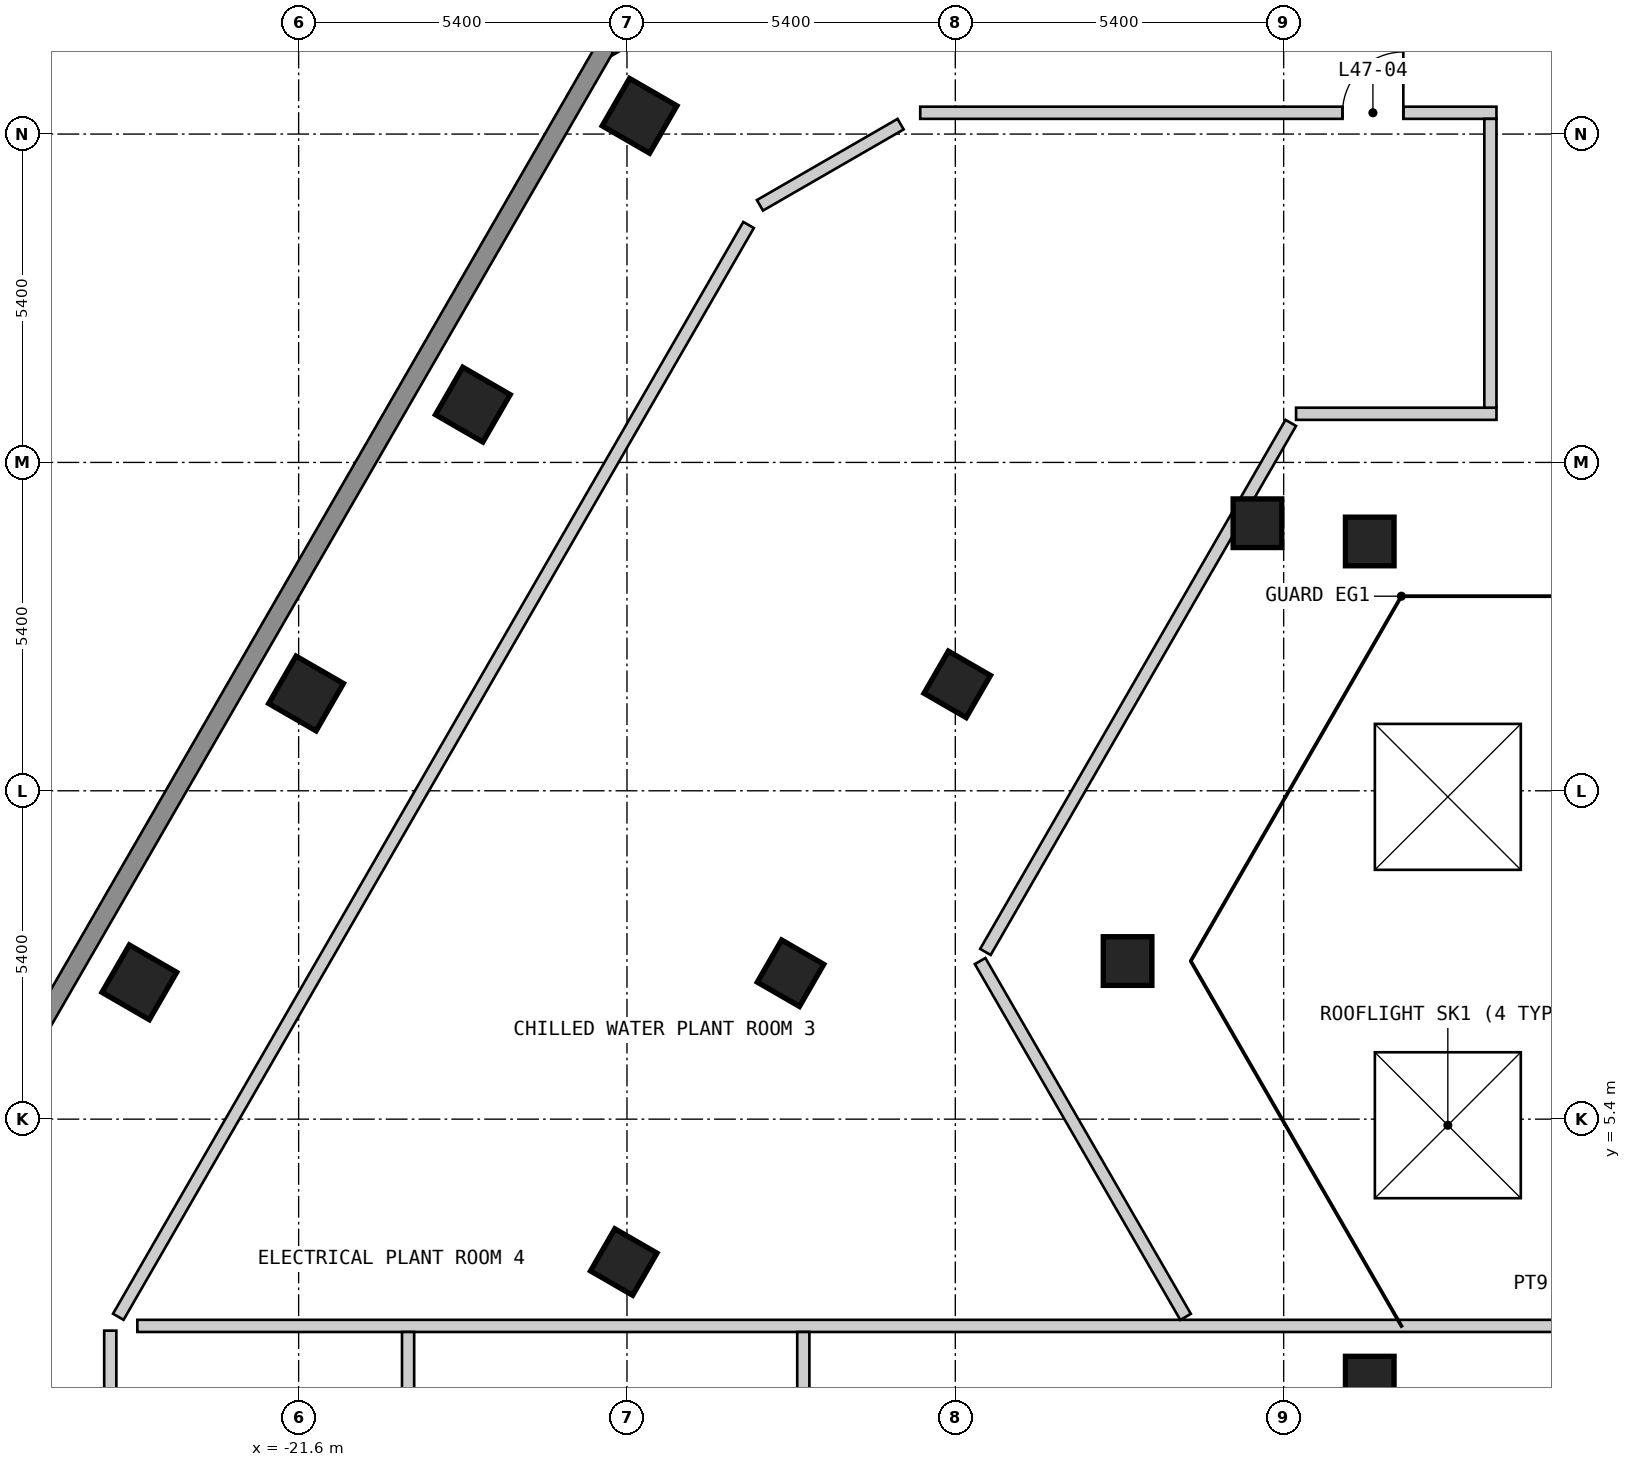
"""IFC4 building model, lengths in metres.
Left out: names, types, materials, properties, quantities, classifications, styles, units other than length and angle.
Written with IfcOpenShell. Run it as: python <this file> out.ifc"""

import sys

from ifc_helpers import new_model, si_unit, direction, frame, frame_2d, origin, origin_2d, place, context, subcontext, project, spatial, polyline, rectangle, outline, extrude, element, fill, save


model = new_model("IFC4")
c1 = context("Model", 3, precision=1e-05, world=origin(), true_north=direction((0.0, 1.0)))
c2 = subcontext(c1, "Body", "Model", "MODEL_VIEW")
j1 = project(units=[si_unit("LENGTHUNIT", "METRE"), si_unit("PLANEANGLEUNIT", "RADIAN")], contexts=[c1])
p1 = place(None, origin())
s1 = spatial("IfcSite", under=j1, at=p1, CompositionType="ELEMENT")
p2 = place(p1, origin())
s2 = spatial("IfcBuilding", under=s1, at=p2, CompositionType="ELEMENT")
p3 = place(p2, frame((0.0, 0.0, 153.6)))
s3 = spatial("IfcBuildingStorey", under=s2, at=p3, CompositionType="ELEMENT", Elevation=153.6)
for number, where, z_axis, x_axis in (
    (1, (-15.993, 21.9, 0.0), (0.0, 0.0, 1.0), (-0.5, -0.866, 0.0)),
    (2, (-18.735, 17.15, 0.0), (0.0, 0.0, 1.0), (-0.5, -0.866, 0.0)),
    (3, (-21.478, 12.4, 0.0), (0.0, 0.0, 1.0), (-0.5, -0.866, 0.0)),
    (4, (-24.22, 7.65, 0.0), (0.0, 0.0, 1.0), (-0.5, -0.866, 0.0)),
):
    element("IfcColumn", number, at=place(p3, frame(where, z_axis=z_axis, x_axis=x_axis)), inside=s3, PredefinedType="COLUMN", context=c2, shape_type="SweptSolid", body=[
        extrude(rectangle(XDim=0.9, YDim=0.9, at=origin_2d()), origin(), (0.0, 0.0, 1.0), 3.6),
    ])
for number, where, z_axis, x_axis in (
    (5, (-3.984, 14.9, 0.0), (0.0, 0.0, 1.0), (1.0, 0.0, 0.0)),
    (6, (-5.831, 15.2, 0.0), (0.0, 0.0, 1.0), (-1.0, 0.0, 0.0)),
):
    element("IfcColumn", number, at=place(p3, frame(where, z_axis=z_axis, x_axis=x_axis)), inside=s3, PredefinedType="COLUMN", context=c2, shape_type="SweptSolid", body=[
        extrude(rectangle(XDim=0.8, YDim=0.8, at=origin_2d()), origin(), (0.0, 0.0, 1.0), 2.6),
    ])
for number, where, z_axis, x_axis in (
    (7, (-10.768, 12.55, 0.0), (0.0, 0.0, 1.0), (-0.5, -0.866, 0.0)),
    (8, (-7.967, 8.0, 0.0), (0.0, 0.0, 1.0), (1.0, 0.0, 0.0)),
    (9, (-13.51, 7.8, 0.0), (0.0, 0.0, 1.0), (-0.5, -0.866, 0.0)),
    (10, (-3.984, 1.1, 0.0), (0.0, 0.0, 1.0), (1.0, 0.0, 0.0)),
    (11, (-16.253, 3.05, 0.0), (0.0, 0.0, 1.0), (-0.5, -0.866, 0.0)),
):
    element("IfcColumn", number, at=place(p3, frame(where, z_axis=z_axis, x_axis=x_axis)), inside=s3, PredefinedType="COLUMN", context=c2, shape_type="SweptSolid", body=[
        extrude(rectangle(XDim=0.8, YDim=0.8, at=origin_2d()), origin(), (0.0, 0.0, 1.0), 3.6),
    ])
p4 = place(p3, frame((-12.28, 25.47, 0.0), z_axis=(0.0, 0.0, 1.0), x_axis=(-0.866022959057, -0.500004234368, 0.0)))
e12 = element("IfcWall", 12, at=p4, inside=s3, PredefinedType="SOLIDWALL", context=c2, shape_type="SweptSolid", body=[
    extrude(outline(polyline([(0.0, -0.15), (5.0, -0.15), (4.92, 0.15), (0.08, 0.15), (0.0, -0.15)])), origin(), (0.0, 0.0, 1.0), 2.6),
])
p5 = place(p3, frame((-16.555, 23.025, 0.0), z_axis=(0.0, 0.0, 1.0), x_axis=(-0.500020536353, -0.866013546791, 0.0)))
e13 = element("IfcWall", 13, at=p5, inside=s3, PredefinedType="SOLIDWALL", context=c2, shape_type="SweptSolid", body=[
    extrude(outline(polyline([(0.0, -0.15), (23.325, -0.15), (23.245, 0.15), (0.08, 0.15), (0.0, -0.15)])), origin(), (0.0, 0.0, 1.0), 2.6),
])
p6 = place(p3, frame((-24.253, 2.0, 0.0), z_axis=(0.0, 0.0, 1.0), x_axis=(1.0, 0.0, 0.0)))
e14 = element("IfcWall", 14, at=p6, inside=s3, PredefinedType="SOLIDWALL", context=c2, shape_type="SweptSolid", body=[
    extrude(rectangle(XDim=48.506, YDim=0.2, at=frame_2d((24.253, 0.0))), origin(), (0.0, 0.0, 1.0), 2.6),
])
p7 = place(p6, frame((38.153, 0.0, 0.0)))
e15 = element("IfcOpeningElement", 15, at=p7, cuts=e14, PredefinedType="OPENING", context=c2, shape_type="SweptSolid", body=[
    extrude(rectangle(XDim=1.0, YDim=2.1, at=frame_2d((0.5, 1.05))), frame((0.0, 0.11, 0.0), z_axis=(0.0, -1.0, 0.0), x_axis=(1.0, 0.0, 0.0)), (0.0, 0.0, 1.0), 0.22),
])
p8 = place(p6, frame((28.801, 0.0, 0.0)))
e16 = element("IfcOpeningElement", 16, at=p8, cuts=e14, PredefinedType="OPENING", context=c2, shape_type="SweptSolid", body=[
    extrude(rectangle(XDim=1.8, YDim=2.1, at=frame_2d((0.9, 1.05))), frame((0.0, 0.11, 0.0), z_axis=(0.0, -1.0, 0.0), x_axis=(1.0, 0.0, 0.0)), (0.0, 0.0, 1.0), 0.22),
])
p9 = place(p3, frame((-5.196, 17.0, 0.0), z_axis=(0.0, 0.0, 1.0), x_axis=(1.0, 0.0, 0.0)))
e17 = element("IfcWall", 17, at=p9, inside=s3, PredefinedType="SOLIDWALL", context=c2, shape_type="SweptSolid", body=[
    extrude(rectangle(XDim=3.296, YDim=0.2, at=frame_2d((1.648, 0.0))), origin(), (0.0, 0.0, 1.0), 2.6),
])
p10 = place(p3, frame((-11.377, 21.95, 0.0), z_axis=(0.0, 0.0, 1.0), x_axis=(1.0, 0.0, 0.0)))
e18 = element("IfcWall", 18, at=p10, inside=s3, PredefinedType="SOLIDWALL", context=c2, shape_type="SweptSolid", body=[
    extrude(rectangle(XDim=9.477, YDim=0.2, at=frame_2d((4.739, 0.0))), origin(), (0.0, 0.0, 1.0), 2.6),
])
p11 = place(p10, frame((7.945, 0.0, 0.0), z_axis=(0.0, 0.0, 1.0), x_axis=(-1.0, 0.0, 0.0)))
e19 = element("IfcOpeningElement", 19, at=p11, cuts=e18, PredefinedType="OPENING", context=c2, shape_type="SweptSolid", body=[
    extrude(rectangle(XDim=1.0, YDim=2.1, at=frame_2d((0.5, 1.05))), frame((0.0, 0.11, 0.0), z_axis=(0.0, -1.0, 0.0), x_axis=(1.0, 0.0, 0.0)), (0.0, 0.0, 1.0), 0.22),
])
p12 = place(p3, frame((-24.698, -1.122, 0.0), z_axis=(0.0, 0.0, 1.0), x_axis=(0.0, 1.0, 0.0)))
e20 = element("IfcWall", 20, at=p12, inside=s3, PredefinedType="SOLIDWALL", context=c2, shape_type="SweptSolid", body=[
    extrude(rectangle(XDim=3.044, YDim=0.2, at=frame_2d((1.522, 0.0))), origin(), (0.0, 0.0, 1.0), 2.6),
])
p13 = place(p3, frame((-19.8, -9.605, 0.0), z_axis=(0.0, 0.0, 1.0), x_axis=(0.0, 1.0, 0.0)))
e21 = element("IfcWall", 21, at=p13, inside=s3, PredefinedType="SOLIDWALL", context=c2, shape_type="SweptSolid", body=[
    extrude(rectangle(XDim=11.505, YDim=0.2, at=frame_2d((5.752, 0.0))), origin(), (0.0, 0.0, 1.0), 2.6),
])
p14 = place(p13, frame((5.302, 0.0, 0.0)))
e22 = element("IfcOpeningElement", 22, at=p14, cuts=e21, PredefinedType="OPENING", context=c2, shape_type="SweptSolid", body=[
    extrude(rectangle(XDim=1.0, YDim=2.1, at=frame_2d((0.5, 1.05))), frame((0.0, 0.11, 0.0), z_axis=(0.0, -1.0, 0.0), x_axis=(1.0, 0.0, 0.0)), (0.0, 0.0, 1.0), 0.22),
])
p15 = place(p3, frame((-13.3, -4.88, 0.0), z_axis=(0.0, 0.0, 1.0), x_axis=(0.0, 1.0, 0.0)))
e23 = element("IfcWall", 23, at=p15, inside=s3, PredefinedType="PARTITIONING", context=c2, shape_type="SweptSolid", body=[
    extrude(rectangle(XDim=6.78, YDim=0.2, at=frame_2d((3.39, 0.0))), origin(), (0.0, 0.0, 1.0), 2.6),
])
p16 = place(p3, frame((-2.0, 17.1, 0.0), z_axis=(0.0, 0.0, 1.0), x_axis=(0.0, 1.0, 0.0)))
e24 = element("IfcWall", 24, at=p16, inside=s3, PredefinedType="SOLIDWALL", context=c2, shape_type="SweptSolid", body=[
    extrude(rectangle(XDim=4.75, YDim=0.2, at=frame_2d((2.375, 0.0))), origin(), (0.0, 0.0, 1.0), 2.6),
])
p17 = place(p3, frame((-10.392, 8.0, 0.0), z_axis=(0.0, 0.0, 1.0), x_axis=(0.500051862572, -0.865995458844, 0.0)))
e25 = element("IfcWall", 25, at=p17, inside=s3, PredefinedType="SOLIDWALL", context=c2, shape_type="SweptSolid", body=[
    extrude(rectangle(XDim=6.758, YDim=0.2, at=frame_2d((3.379, 0.0))), origin(), (0.0, 0.0, 1.0), 2.6),
])
p18 = place(p3, frame((-14.013, 20.428, 0.0), z_axis=(0.0, 0.0, 1.0), x_axis=(0.866097299559, 0.499875452184, 0.0)))
e26 = element("IfcWall", 26, at=p18, inside=s3, PredefinedType="SOLIDWALL", context=c2, shape_type="SweptSolid", body=[
    extrude(rectangle(XDim=2.671, YDim=0.2, at=frame_2d((1.335, 0.0))), origin(), (0.0, 0.0, 1.0), 2.6),
])
p19 = place(p3, frame((-10.305, 8.15, 0.0), z_axis=(0.0, 0.0, 1.0), x_axis=(0.499918809126, 0.866072274283, 0.0)))
e27 = element("IfcWall", 27, at=p19, inside=s3, PredefinedType="SOLIDWALL", context=c2, shape_type="SweptSolid", body=[
    extrude(rectangle(XDim=10.046, YDim=0.2, at=frame_2d((5.023, 0.0))), origin(), (0.0, 0.0, 1.0), 2.6),
])
p20 = place(p3, frame((-24.566, 2.15, 0.0), z_axis=(0.0, 0.0, 1.0), x_axis=(0.499985443393, 0.866033807882, 0.0)))
e28 = element("IfcWall", 28, at=p20, inside=s3, PredefinedType="SOLIDWALL", context=c2, shape_type="SweptSolid", body=[
    extrude(rectangle(XDim=20.732, YDim=0.2, at=frame_2d((10.366, 0.0))), origin(), (0.0, 0.0, 1.0), 2.6),
])
p21 = place(p3, frame((0.0, 0.0, -0.4)))
p22 = place(p21, frame((-2.7, 5.3, 0.0)))
p23 = place(p22, frame((0.0, 0.0, 0.35)))
e29 = element("IfcWindow", 29, at=p23, inside=s3, PartitioningType="SINGLE_PANEL", PredefinedType="SKYLIGHT", context=c2, shape_type="SweptSolid", body=[
    extrude(rectangle(XDim=2.4, YDim=2.4, at=origin_2d()), origin(), (0.0, 0.0, 1.0), 0.05),
])
p24 = place(p21, frame((-2.7, 10.7, 0.0)))
p25 = place(p24, frame((0.0, 0.0, 0.35)))
e30 = element("IfcWindow", 30, at=p25, inside=s3, PartitioningType="SINGLE_PANEL", PredefinedType="SKYLIGHT", context=c2, shape_type="SweptSolid", body=[
    extrude(rectangle(XDim=2.4, YDim=2.4, at=origin_2d()), origin(), (0.0, 0.0, 1.0), 0.05),
])
p26 = place(p11, origin())
e31 = element("IfcDoor", 31, at=p26, inside=s3, OperationType="SINGLE_SWING_LEFT", PredefinedType="DOOR", context=c2, shape_type="SweptSolid", body=[
    extrude(rectangle(XDim=1.0, YDim=2.1, at=frame_2d((0.5, 1.05))), frame((0.0, 0.025, 0.0), z_axis=(0.0, -1.0, 0.0), x_axis=(1.0, 0.0, 0.0)), (0.0, 0.0, 1.0), 0.05),
])
fill(e19, e31)
save(model, sys.argv[1])
